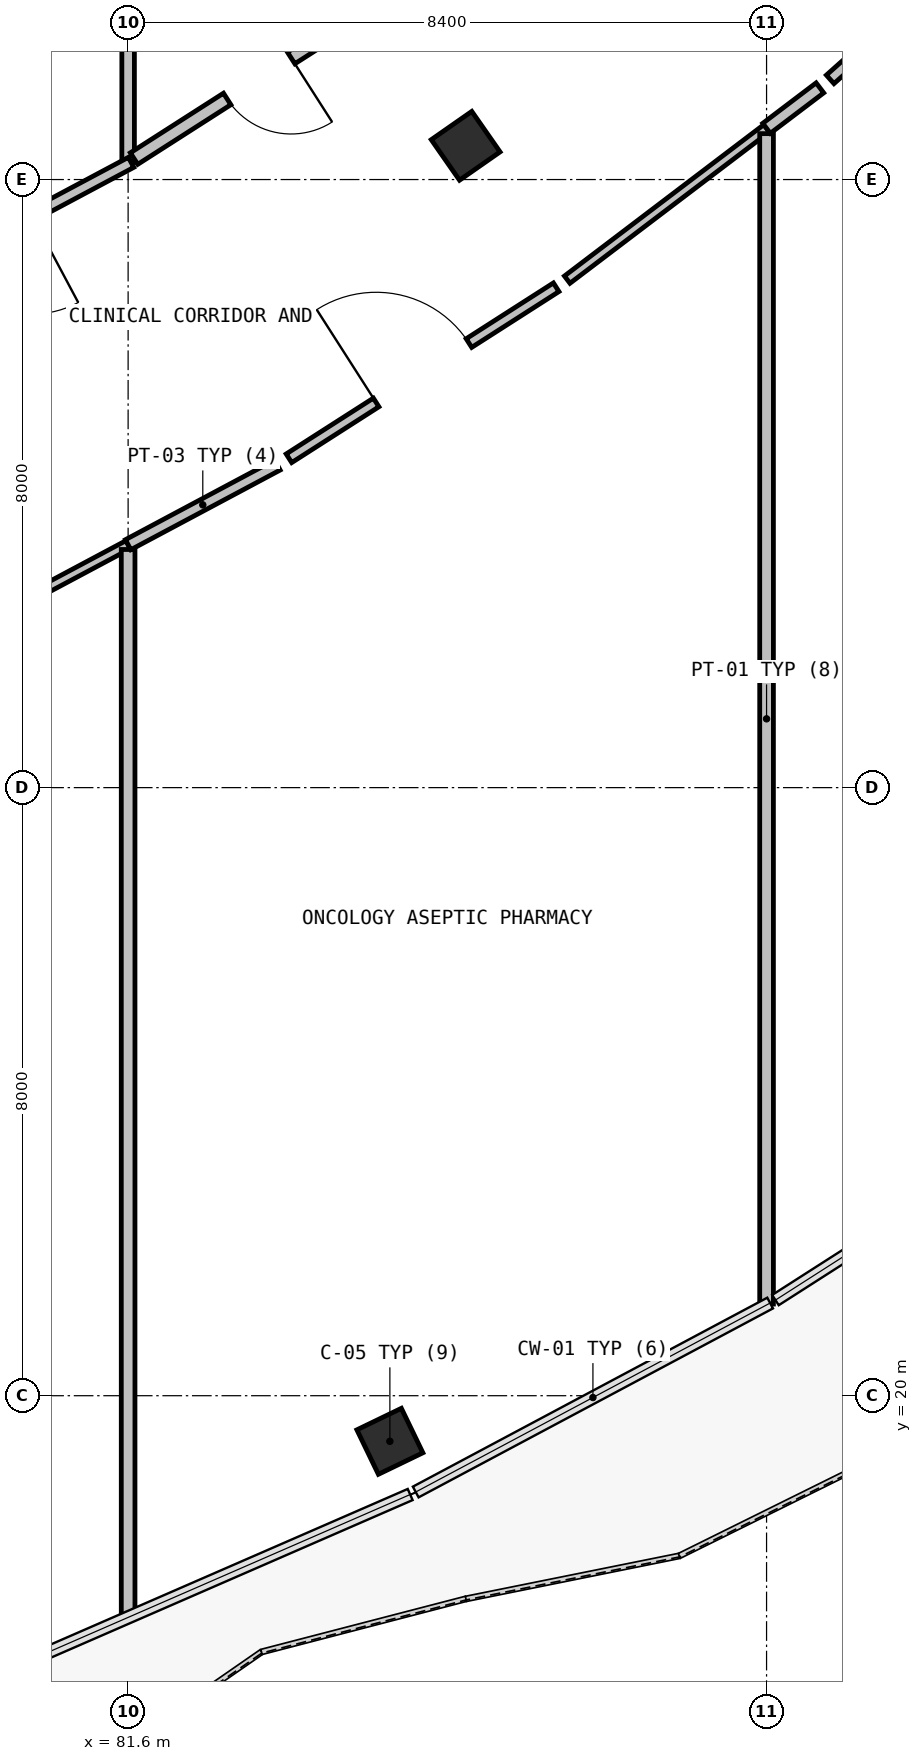
"""IFC4 building model, lengths in metres.
Left out: names, types, materials, properties, quantities, classifications, styles, units other than length and angle.
Written with IfcOpenShell. Run it as: python <this file> out.ifc"""

import sys

from ifc_helpers import new_model, si_unit, direction, frame, frame_2d, origin, origin_2d, place, context, subcontext, project, spatial, rectangle, extrude, element, fill, save


model = new_model("IFC4")
c1 = context("Model", 3, precision=1e-05, world=origin(), true_north=direction((0.0, 1.0)))
c2 = subcontext(c1, "Body", "Model", "MODEL_VIEW")
j1 = project(units=[si_unit("LENGTHUNIT", "METRE"), si_unit("PLANEANGLEUNIT", "RADIAN")], contexts=[c1])
p1 = place(None, origin())
s1 = spatial("IfcSite", under=j1, at=p1, CompositionType="ELEMENT")
p2 = place(p1, origin())
s2 = spatial("IfcBuilding", under=s1, at=p2, CompositionType="ELEMENT")
p3 = place(p2, frame((0.0, 0.0, 15.0)))
s3 = spatial("IfcBuildingStorey", under=s2, at=p3, CompositionType="ELEMENT", Elevation=15.0)
for number, where, z_axis, x_axis in (
    (1, (85.044, 19.4, 0.0), (0.0, 0.0, 1.0), (-0.435, 0.9, 0.0)),
    (2, (86.041, 36.444, 0.0), (0.0, 0.0, 1.0), (-0.572, 0.82, 0.0)),
):
    element("IfcColumn", number, at=place(p3, frame(where, z_axis=z_axis, x_axis=x_axis)), inside=s3, PredefinedType="COLUMN", context=c2, shape_type="SweptSolid", body=[
        extrude(rectangle(XDim=0.65, YDim=0.65, at=origin_2d()), origin(), (0.0, 0.0, 1.0), 3.91),
    ])
p4 = place(p3, frame((79.882, 30.28, 0.0), z_axis=(0.0, 0.0, 1.0), x_axis=(0.882408473544, 0.470484097305, 0.0)))
e3 = element("IfcWall", 3, at=p4, inside=s3, PredefinedType="PARTITIONING", context=c2, shape_type="SweptSolid", body=[
    extrude(rectangle(XDim=1.947, YDim=0.12, at=frame_2d((0.974, 0.0))), origin(), (0.0, 0.0, 1.0), 3.895),
])
p5 = place(p3, frame((81.6, 31.133, 0.0), z_axis=(0.0, 0.0, 1.0), x_axis=(0.0, -1.0, 0.0)))
e4 = element("IfcWall", 4, at=p5, inside=s3, PredefinedType="PARTITIONING", context=c2, shape_type="SweptSolid", body=[
    extrude(rectangle(XDim=14.038, YDim=0.18, at=frame_2d((7.019, 0.0))), origin(), (0.0, 0.0, 1.0), 3.895),
])
p6 = place(p3, frame((81.6, 50.02, 0.0), z_axis=(0.0, 0.0, 1.0), x_axis=(0.0, -1.0, 0.0)))
e5 = element("IfcWall", 5, at=p6, inside=s3, PredefinedType="PARTITIONING", context=c2, shape_type="SweptSolid", body=[
    extrude(rectangle(XDim=13.794, YDim=0.165, at=frame_2d((6.897, 0.0))), origin(), (0.0, 0.0, 1.0), 3.895),
])
p7 = place(p3, frame((81.639, 36.226, 0.0), z_axis=(0.0, 0.0, 1.0), x_axis=(-0.882373557975, -0.470549576758, 0.0)))
e6 = element("IfcWall", 6, at=p7, inside=s3, PredefinedType="PARTITIONING", context=c2, shape_type="SweptSolid", body=[
    extrude(rectangle(XDim=4.261, YDim=0.15, at=frame_2d((2.131, 0.0))), origin(), (0.0, 0.0, 1.0), 3.895),
])
p8 = place(p7, frame((1.481, 0.0, 0.0)))
e7 = element("IfcOpeningElement", 7, at=p8, cuts=e6, PredefinedType="OPENING", context=c2, shape_type="SweptSolid", body=[
    extrude(rectangle(XDim=1.3, YDim=2.15, at=frame_2d((0.65, 1.075))), frame((0.0, 0.085, 0.0), z_axis=(0.0, -1.0, 0.0), x_axis=(1.0, 0.0, 0.0)), (0.0, 0.0, 1.0), 0.17),
])
p9 = place(p3, frame((81.6, 31.196, 0.0), z_axis=(0.0, 0.0, 1.0), x_axis=(0.882365080709, 0.470565472963, 0.0)))
e8 = element("IfcWall", 8, at=p9, inside=s3, PredefinedType="PARTITIONING", context=c2, shape_type="SweptSolid", body=[
    extrude(rectangle(XDim=2.227, YDim=0.15, at=frame_2d((1.113, 0.0))), origin(), (0.0, 0.0, 1.0), 3.895),
])
p10 = place(p3, frame((83.716, 32.333, 0.0), z_axis=(0.0, 0.0, 1.0), x_axis=(0.842288395676, 0.539027140792, 0.0)))
e9 = element("IfcWall", 9, at=p10, inside=s3, PredefinedType="PARTITIONING", context=c2, shape_type="SweptSolid", body=[
    extrude(rectangle(XDim=4.174, YDim=0.135, at=frame_2d((2.087, 0.0))), origin(), (0.0, 0.0, 1.0), 3.895),
])
p11 = place(p10, frame((1.362, 0.0, 0.0)))
e10 = element("IfcOpeningElement", 10, at=p11, cuts=e9, PredefinedType="OPENING", context=c2, shape_type="SweptSolid", body=[
    extrude(rectangle(XDim=1.45, YDim=2.15, at=frame_2d((0.725, 1.075))), frame((0.0, 0.077, 0.0), z_axis=(0.0, -1.0, 0.0), x_axis=(1.0, 0.0, 0.0)), (0.0, 0.0, 1.0), 0.155),
])
p12 = place(p3, frame((87.377, 34.683, 0.0), z_axis=(0.0, 0.0, 1.0), x_axis=(0.796534911727, 0.604592535846, 0.0)))
e11 = element("IfcWall", 11, at=p12, inside=s3, PredefinedType="PARTITIONING", context=c2, shape_type="SweptSolid", body=[
    extrude(rectangle(XDim=3.293, YDim=0.12, at=frame_2d((1.646, 0.0))), origin(), (0.0, 0.0, 1.0), 3.895),
])
p13 = place(p3, frame((90.0, 36.604, 0.0), z_axis=(0.0, 0.0, 1.0), x_axis=(0.0, -1.0, 0.0)))
e12 = element("IfcWall", 12, at=p13, inside=s3, PredefinedType="PARTITIONING", context=c2, shape_type="SweptSolid", body=[
    extrude(rectangle(XDim=15.398, YDim=0.18, at=frame_2d((7.699, 0.0))), origin(), (0.0, 0.0, 1.0), 3.895),
])
p14 = place(p3, frame((84.97, 38.383, 0.0), z_axis=(0.0, 0.0, 1.0), x_axis=(-0.842236233033, -0.539108641895, 0.0)))
e13 = element("IfcWall", 13, at=p14, inside=s3, PredefinedType="PARTITIONING", context=c2, shape_type="SweptSolid", body=[
    extrude(rectangle(XDim=3.909, YDim=0.18, at=frame_2d((1.954, 0.0))), origin(), (0.0, 0.0, 1.0), 3.895),
])
p15 = place(p14, frame((1.454, 0.0, 0.0)))
e14 = element("IfcOpeningElement", 14, at=p15, cuts=e13, PredefinedType="OPENING", context=c2, shape_type="SweptSolid", body=[
    extrude(rectangle(XDim=1.0, YDim=2.15, at=frame_2d((0.5, 1.075))), frame((0.0, 0.1, 0.0), z_axis=(0.0, -1.0, 0.0), x_axis=(1.0, 0.0, 0.0)), (0.0, 0.0, 1.0), 0.2),
])
p16 = place(p3, frame((90.0, 36.674, 0.0), z_axis=(0.0, 0.0, 1.0), x_axis=(0.796962746225, 0.60402846053, 0.0)))
e15 = element("IfcWall", 15, at=p16, inside=s3, PredefinedType="PARTITIONING", context=c2, shape_type="SweptSolid", body=[
    extrude(rectangle(XDim=0.881, YDim=0.165, at=frame_2d((0.44, 0.0))), origin(), (0.0, 0.0, 1.0), 3.895),
])
p17 = place(p3, frame((90.837, 37.318, 0.0), z_axis=(0.0, 0.0, 1.0), x_axis=(0.746227117169, 0.66569143723, 0.0)))
e16 = element("IfcWall", 16, at=p17, inside=s3, PredefinedType="PARTITIONING", context=c2, shape_type="SweptSolid", body=[
    extrude(rectangle(XDim=4.174, YDim=0.15, at=frame_2d((2.087, 0.0))), origin(), (0.0, 0.0, 1.0), 3.895),
])
p18 = place(p17, frame((1.462, 0.0, 0.0)))
e17 = element("IfcOpeningElement", 17, at=p18, cuts=e16, PredefinedType="OPENING", context=c2, shape_type="SweptSolid", body=[
    extrude(rectangle(XDim=1.25, YDim=2.15, at=frame_2d((0.625, 1.075))), frame((0.0, 0.085, 0.0), z_axis=(0.0, -1.0, 0.0), x_axis=(1.0, 0.0, 0.0)), (0.0, 0.0, 1.0), 0.17),
])
p19 = place(p11, origin())
e18 = element("IfcDoor", 18, at=p19, inside=s3, OperationType="SINGLE_SWING_LEFT", PredefinedType="DOOR", context=c2, shape_type="SweptSolid", body=[
    extrude(rectangle(XDim=1.45, YDim=2.15, at=frame_2d((0.725, 1.075))), frame((0.0, 0.025, 0.0), z_axis=(0.0, -1.0, 0.0), x_axis=(1.0, 0.0, 0.0)), (0.0, 0.0, 1.0), 0.05),
])
fill(e10, e18)
p20 = place(p15, origin())
e19 = element("IfcDoor", 19, at=p20, inside=s3, OperationType="SINGLE_SWING_RIGHT", PredefinedType="DOOR", context=c2, shape_type="SweptSolid", body=[
    extrude(rectangle(XDim=1.0, YDim=2.15, at=frame_2d((0.5, 1.075))), frame((0.0, 0.025, 0.0), z_axis=(0.0, -1.0, 0.0), x_axis=(1.0, 0.0, 0.0)), (0.0, 0.0, 1.0), 0.05),
])
fill(e14, e19)
save(model, sys.argv[1])
